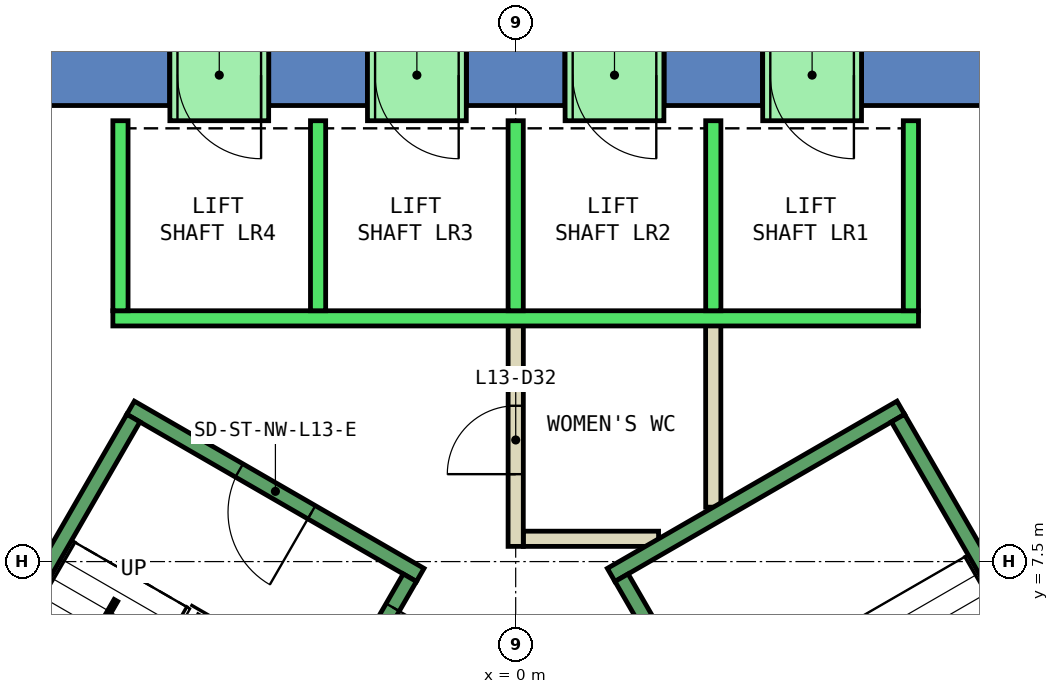
"""IFC4 building model, lengths in metres.
Left out: names, types, materials, properties, quantities, classifications, styles, units other than length and angle.
Written with IfcOpenShell. Run it as: python <this file> out.ifc"""

import sys

from ifc_helpers import new_model, si_unit, direction, frame, frame_2d, origin, place, context, subcontext, project, spatial, polyline, rectangle, outline, extrude, element, fill, save


model = new_model("IFC4")
c1 = context("Model", 3, precision=1e-05, world=origin(), true_north=direction((0.0, 1.0)))
c2 = subcontext(c1, "Body", "Model", "MODEL_VIEW")
j1 = project(units=[si_unit("LENGTHUNIT", "METRE"), si_unit("PLANEANGLEUNIT", "RADIAN")], contexts=[c1])
p1 = place(None, origin())
s1 = spatial("IfcSite", under=j1, at=p1, CompositionType="ELEMENT")
p2 = place(p1, origin())
s2 = spatial("IfcBuilding", under=s1, at=p2, CompositionType="ELEMENT")
p3 = place(p2, frame((0.0, 0.0, 64.4)))
s3 = spatial("IfcBuildingStorey", under=s2, at=p3, CompositionType="ELEMENT", Elevation=64.4)
p4 = place(p3, frame((0.0, 0.0, -0.4)))
e1 = element("IfcWall", 1, at=p4, inside=s3, PredefinedType="SHEAR", context=c2, shape_type="SweptSolid", body=[
    extrude(outline(polyline([(4.55, 14.5), (4.55, 13.5), (6.351, 13.5), (6.928, 14.5), (4.55, 14.5)])), origin(), (0.0, 0.0, 1.0), 4.2),
])
p5 = place(p3, frame((0.0, 0.0, -0.4)))
e2 = element("IfcWall", 2, at=p5, inside=s3, PredefinedType="SHEAR", context=c2, shape_type="SweptSolid", body=[
    extrude(outline(polyline([(1.95, 14.5), (1.95, 13.5), (3.25, 13.5), (3.25, 14.5), (1.95, 14.5)])), origin(), (0.0, 0.0, 1.0), 4.2),
])
p6 = place(p3, frame((0.0, 0.0, -0.4)))
e3 = element("IfcWall", 3, at=p6, inside=s3, PredefinedType="SHEAR", context=c2, shape_type="SweptSolid", body=[
    extrude(outline(polyline([(-0.65, 14.5), (-0.65, 13.5), (0.65, 13.5), (0.65, 14.5), (-0.65, 14.5)])), origin(), (0.0, 0.0, 1.0), 4.2),
])
p7 = place(p3, frame((0.0, 0.0, -0.4)))
e4 = element("IfcWall", 4, at=p7, inside=s3, PredefinedType="SHEAR", context=c2, shape_type="SweptSolid", body=[
    extrude(outline(polyline([(-3.25, 14.5), (-3.25, 13.5), (-1.95, 13.5), (-1.95, 14.5), (-3.25, 14.5)])), origin(), (0.0, 0.0, 1.0), 4.2),
])
p8 = place(p3, frame((0.0, 0.0, -0.4)))
e5 = element("IfcWall", 5, at=p8, inside=s3, PredefinedType="SHEAR", context=c2, shape_type="SweptSolid", body=[
    extrude(outline(polyline([(-4.55, 13.5), (-4.55, 14.5), (-6.928, 14.5), (-6.351, 13.5), (-4.55, 13.5)])), origin(), (0.0, 0.0, 1.0), 4.2),
])
p9 = place(p3, frame((0.0, 0.0, 3.6)))
e6 = element("IfcWall", 6, at=p9, inside=s3, PredefinedType="SHEAR", context=c2, shape_type="SweptSolid", body=[
    extrude(outline(polyline([(3.25, 14.5), (3.25, 13.5), (4.55, 13.5), (4.55, 14.5), (3.25, 14.5)])), origin(), (0.0, 0.0, 1.0), 0.2),
])
p10 = place(p3, frame((0.0, 0.0, 3.6)))
e7 = element("IfcWall", 7, at=p10, inside=s3, PredefinedType="SHEAR", context=c2, shape_type="SweptSolid", body=[
    extrude(outline(polyline([(0.65, 14.5), (0.65, 13.5), (1.95, 13.5), (1.95, 14.5), (0.65, 14.5)])), origin(), (0.0, 0.0, 1.0), 0.2),
])
p11 = place(p3, frame((0.0, 0.0, 3.6)))
e8 = element("IfcWall", 8, at=p11, inside=s3, PredefinedType="SHEAR", context=c2, shape_type="SweptSolid", body=[
    extrude(outline(polyline([(-1.95, 14.5), (-1.95, 13.5), (-0.65, 13.5), (-0.65, 14.5), (-1.95, 14.5)])), origin(), (0.0, 0.0, 1.0), 0.2),
])
p12 = place(p3, frame((0.0, 0.0, 3.6)))
e9 = element("IfcWall", 9, at=p12, inside=s3, PredefinedType="SHEAR", context=c2, shape_type="SweptSolid", body=[
    extrude(outline(polyline([(-4.55, 14.5), (-4.55, 13.5), (-3.25, 13.5), (-3.25, 14.5), (-4.55, 14.5)])), origin(), (0.0, 0.0, 1.0), 0.2),
])
p13 = place(p3, frame((1.88, 7.8, 0.0), z_axis=(0.0, 0.0, 1.0), x_axis=(-1.0, 0.0, 0.0)))
e10 = element("IfcWall", 10, at=p13, inside=s3, PredefinedType="PARTITIONING", context=c2, shape_type="SweptSolid", body=[
    extrude(rectangle(XDim=1.78, YDim=0.2, at=frame_2d((0.89, 0.0))), origin(), (0.0, 0.0, 1.0), 3.8),
])
p14 = place(p3, frame((0.0, 7.7, 0.0), z_axis=(0.0, 0.0, 1.0), x_axis=(0.000325520816, 0.999999947018, 0.0)))
e11 = element("IfcWall", 11, at=p14, inside=s3, PredefinedType="PARTITIONING", context=c2, shape_type="SweptSolid", body=[
    extrude(rectangle(XDim=3.0, YDim=0.2, at=frame_2d((1.5, 0.0))), origin(), (0.0, 0.0, 1.0), 3.8),
])
p15 = place(p14, frame((0.95, 0.0, 0.0)))
e12 = element("IfcOpeningElement", 12, at=p15, cuts=e11, PredefinedType="OPENING", context=c2, shape_type="SweptSolid", body=[
    extrude(rectangle(XDim=0.9, YDim=2.1, at=frame_2d((0.45, 1.05))), frame((0.0, 0.11, 0.0), z_axis=(0.0, -1.0, 0.0), x_axis=(1.0, 0.0, 0.0)), (0.0, 0.0, 1.0), 0.22),
])
p16 = place(p3, frame((2.599, 10.7, 0.0), z_axis=(0.0, 0.0, 1.0), x_axis=(0.000393159002, -0.999999922713, 0.0)))
e13 = element("IfcWall", 13, at=p16, inside=s3, PredefinedType="PARTITIONING", context=c2, shape_type="SweptSolid", body=[
    extrude(rectangle(XDim=2.484, YDim=0.2, at=frame_2d((1.242, 0.0))), origin(), (0.0, 0.0, 1.0), 3.8),
])
p17 = place(p3, frame((5.3, 10.7, 0.0), z_axis=(0.0, 0.0, 1.0), x_axis=(-1.0, 0.0, 0.0)))
e14 = element("IfcWall", 14, at=p17, inside=s3, PredefinedType="STANDARD", context=c2, shape_type="SweptSolid", body=[
    extrude(rectangle(XDim=10.6, YDim=0.2, at=frame_2d((5.3, 0.0))), origin(), (0.0, 0.0, 1.0), 3.8),
])
for number, where, z_axis, x_axis in (
    (15, (5.2, 10.8, 0.0), (0.0, 0.0, 1.0), (0.0, 1.0, 0.0)),
    (16, (2.6, 10.8, 0.0), (0.0, 0.0, 1.0), (0.0, 1.0, 0.0)),
    (17, (0.0, 10.8, 0.0), (0.0, 0.0, 1.0), (0.0, 1.0, 0.0)),
    (18, (-2.6, 10.8, 0.0), (0.0, 0.0, 1.0), (0.0, 1.0, 0.0)),
    (19, (-5.2, 10.8, 0.0), (0.0, 0.0, 1.0), (0.0, 1.0, 0.0)),
):
    element("IfcWall", number, at=place(p3, frame(where, z_axis=z_axis, x_axis=x_axis)), inside=s3, PredefinedType="STANDARD", context=c2, shape_type="SweptSolid", body=[
        extrude(rectangle(XDim=2.5, YDim=0.2, at=frame_2d((1.25, 0.0))), origin(), (0.0, 0.0, 1.0), 3.8),
    ])
p18 = place(p3, frame((4.55, 13.9, 0.0), z_axis=(0.0, 0.0, 1.0), x_axis=(-1.0, 0.0, 0.0)))
e20 = element("IfcWall", 20, at=p18, inside=s3, PredefinedType="STANDARD", context=c2, shape_type="SweptSolid", body=[
    extrude(rectangle(XDim=1.3, YDim=1.2, at=frame_2d((0.65, 0.0))), origin(), (0.0, 0.0, 1.0), 2.4),
])
p19 = place(p18, frame((0.1, 0.0, 0.0)))
e21 = element("IfcOpeningElement", 21, at=p19, cuts=e20, PredefinedType="OPENING", context=c2, shape_type="SweptSolid", body=[
    extrude(rectangle(XDim=1.1, YDim=2.3, at=frame_2d((0.55, 1.15))), frame((0.0, 0.61, 0.0), z_axis=(0.0, -1.0, 0.0), x_axis=(1.0, 0.0, 0.0)), (0.0, 0.0, 1.0), 1.22),
])
p20 = place(p3, frame((1.95, 13.9, 0.0), z_axis=(0.0, 0.0, 1.0), x_axis=(-1.0, 0.0, 0.0)))
e22 = element("IfcWall", 22, at=p20, inside=s3, PredefinedType="STANDARD", context=c2, shape_type="SweptSolid", body=[
    extrude(rectangle(XDim=1.3, YDim=1.2, at=frame_2d((0.65, 0.0))), origin(), (0.0, 0.0, 1.0), 2.4),
])
p21 = place(p20, frame((0.1, 0.0, 0.0)))
e23 = element("IfcOpeningElement", 23, at=p21, cuts=e22, PredefinedType="OPENING", context=c2, shape_type="SweptSolid", body=[
    extrude(rectangle(XDim=1.1, YDim=2.3, at=frame_2d((0.55, 1.15))), frame((0.0, 0.61, 0.0), z_axis=(0.0, -1.0, 0.0), x_axis=(1.0, 0.0, 0.0)), (0.0, 0.0, 1.0), 1.22),
])
p22 = place(p3, frame((-0.65, 13.9, 0.0), z_axis=(0.0, 0.0, 1.0), x_axis=(-1.0, 0.0, 0.0)))
e24 = element("IfcWall", 24, at=p22, inside=s3, PredefinedType="STANDARD", context=c2, shape_type="SweptSolid", body=[
    extrude(rectangle(XDim=1.3, YDim=1.2, at=frame_2d((0.65, 0.0))), origin(), (0.0, 0.0, 1.0), 2.4),
])
p23 = place(p22, frame((0.1, 0.0, 0.0)))
e25 = element("IfcOpeningElement", 25, at=p23, cuts=e24, PredefinedType="OPENING", context=c2, shape_type="SweptSolid", body=[
    extrude(rectangle(XDim=1.1, YDim=2.3, at=frame_2d((0.55, 1.15))), frame((0.0, 0.61, 0.0), z_axis=(0.0, -1.0, 0.0), x_axis=(1.0, 0.0, 0.0)), (0.0, 0.0, 1.0), 1.22),
])
p24 = place(p3, frame((-3.25, 13.9, 0.0), z_axis=(0.0, 0.0, 1.0), x_axis=(-1.0, 0.0, 0.0)))
e26 = element("IfcWall", 26, at=p24, inside=s3, PredefinedType="STANDARD", context=c2, shape_type="SweptSolid", body=[
    extrude(rectangle(XDim=1.3, YDim=1.2, at=frame_2d((0.65, 0.0))), origin(), (0.0, 0.0, 1.0), 2.4),
])
p25 = place(p24, frame((0.1, 0.0, 0.0)))
e27 = element("IfcOpeningElement", 27, at=p25, cuts=e26, PredefinedType="OPENING", context=c2, shape_type="SweptSolid", body=[
    extrude(rectangle(XDim=1.1, YDim=2.3, at=frame_2d((0.55, 1.15))), frame((0.0, 0.61, 0.0), z_axis=(0.0, -1.0, 0.0), x_axis=(1.0, 0.0, 0.0)), (0.0, 0.0, 1.0), 1.22),
])
p26 = place(p3, frame((1.256, 7.324, 0.0), z_axis=(0.0, 0.0, 1.0), x_axis=(0.866046073146, 0.499964197906, 0.0)))
e28 = element("IfcWall", 28, at=p26, inside=s3, PredefinedType="STANDARD", context=c2, shape_type="SweptSolid", body=[
    extrude(rectangle(XDim=4.4, YDim=0.2, at=frame_2d((2.2, 0.0))), origin(), (0.0, 0.0, 1.0), 3.8),
])
p27 = place(p3, frame((4.843, 1.312, 0.0), z_axis=(0.0, 0.0, 1.0), x_axis=(-0.499963383562, 0.866046543262, 0.0)))
e29 = element("IfcWall", 29, at=p27, inside=s3, PredefinedType="STANDARD", context=c2, shape_type="SweptSolid", body=[
    extrude(rectangle(XDim=6.9, YDim=0.2, at=frame_2d((3.45, 0.0))), origin(), (0.0, 0.0, 1.0), 3.8),
])
p28 = place(p27, frame((0.45, 0.0, 0.0)))
e30 = element("IfcOpeningElement", 30, at=p28, cuts=e29, PredefinedType="OPENING", context=c2, shape_type="SweptSolid", body=[
    extrude(rectangle(XDim=1.1, YDim=2.2, at=frame_2d((0.55, 1.1))), frame((0.0, 0.11, 0.0), z_axis=(0.0, -1.0, 0.0), x_axis=(1.0, 0.0, 0.0)), (0.0, 0.0, 1.0), 0.22),
])
p29 = place(p3, frame((8.48, 3.412, 0.0), z_axis=(0.0, 0.0, 1.0), x_axis=(-0.499978703459, 0.866037698999, 0.0)))
e31 = element("IfcWall", 31, at=p29, inside=s3, PredefinedType="STANDARD", context=c2, shape_type="SweptSolid", body=[
    extrude(rectangle(XDim=6.9, YDim=0.2, at=frame_2d((3.45, 0.0))), origin(), (0.0, 0.0, 1.0), 3.8),
])
p30 = place(p3, frame((-1.256, 7.324, 0.0), z_axis=(0.0, 0.0, 1.0), x_axis=(-0.866046073146, 0.499964197906, 0.0)))
e32 = element("IfcWall", 32, at=p30, inside=s3, PredefinedType="STANDARD", context=c2, shape_type="SweptSolid", body=[
    extrude(rectangle(XDim=4.4, YDim=0.2, at=frame_2d((2.2, 0.0))), origin(), (0.0, 0.0, 1.0), 3.8),
])
p31 = place(p30, frame((1.65, 0.0, 0.0)))
e33 = element("IfcOpeningElement", 33, at=p31, cuts=e32, PredefinedType="OPENING", context=c2, shape_type="SweptSolid", body=[
    extrude(rectangle(XDim=1.1, YDim=2.2, at=frame_2d((0.55, 1.1))), frame((0.0, 0.11, 0.0), z_axis=(0.0, -1.0, 0.0), x_axis=(1.0, 0.0, 0.0)), (0.0, 0.0, 1.0), 0.22),
])
p32 = place(p3, frame((-1.393, 7.288, 0.0), z_axis=(0.0, 0.0, 1.0), x_axis=(-0.499963383562, -0.866046543262, 0.0)))
e34 = element("IfcWall", 34, at=p32, inside=s3, PredefinedType="STANDARD", context=c2, shape_type="SweptSolid", body=[
    extrude(rectangle(XDim=6.9, YDim=0.2, at=frame_2d((3.45, 0.0))), origin(), (0.0, 0.0, 1.0), 3.8),
])
p33 = place(p32, frame((0.45, 0.0, 0.0)))
e35 = element("IfcOpeningElement", 35, at=p33, cuts=e34, PredefinedType="OPENING", context=c2, shape_type="SweptSolid", body=[
    extrude(rectangle(XDim=1.1, YDim=2.2, at=frame_2d((0.55, 1.1))), frame((0.0, 0.11, 0.0), z_axis=(0.0, -1.0, 0.0), x_axis=(1.0, 0.0, 0.0)), (0.0, 0.0, 1.0), 0.22),
])
p34 = place(p3, frame((-5.03, 9.388, 0.0), z_axis=(0.0, 0.0, 1.0), x_axis=(-0.499978703459, -0.866037698999, 0.0)))
e36 = element("IfcWall", 36, at=p34, inside=s3, PredefinedType="STANDARD", context=c2, shape_type="SweptSolid", body=[
    extrude(rectangle(XDim=6.9, YDim=0.2, at=frame_2d((3.45, 0.0))), origin(), (0.0, 0.0, 1.0), 3.8),
])
p35 = place(p15, origin())
e37 = element("IfcDoor", 37, at=p35, inside=s3, OperationType="SINGLE_SWING_RIGHT", PredefinedType="DOOR", context=c2, shape_type="SweptSolid", body=[
    extrude(rectangle(XDim=0.9, YDim=2.1, at=frame_2d((0.45, 1.05))), frame((0.0, 0.025, 0.0), z_axis=(0.0, -1.0, 0.0), x_axis=(1.0, 0.0, 0.0)), (0.0, 0.0, 1.0), 0.05),
])
fill(e12, e37)
p36 = place(p19, origin())
e38 = element("IfcDoor", 38, at=p36, inside=s3, OperationType="SLIDING_TO_LEFT", PredefinedType="DOOR", context=c2, shape_type="SweptSolid", body=[
    extrude(rectangle(XDim=1.1, YDim=2.3, at=frame_2d((0.55, 1.15))), frame((0.0, 0.025, 0.0), z_axis=(0.0, -1.0, 0.0), x_axis=(1.0, 0.0, 0.0)), (0.0, 0.0, 1.0), 0.05),
])
fill(e21, e38)
p37 = place(p21, origin())
e39 = element("IfcDoor", 39, at=p37, inside=s3, OperationType="SLIDING_TO_LEFT", PredefinedType="DOOR", context=c2, shape_type="SweptSolid", body=[
    extrude(rectangle(XDim=1.1, YDim=2.3, at=frame_2d((0.55, 1.15))), frame((0.0, 0.025, 0.0), z_axis=(0.0, -1.0, 0.0), x_axis=(1.0, 0.0, 0.0)), (0.0, 0.0, 1.0), 0.05),
])
fill(e23, e39)
p38 = place(p23, origin())
e40 = element("IfcDoor", 40, at=p38, inside=s3, OperationType="SLIDING_TO_LEFT", PredefinedType="DOOR", context=c2, shape_type="SweptSolid", body=[
    extrude(rectangle(XDim=1.1, YDim=2.3, at=frame_2d((0.55, 1.15))), frame((0.0, 0.025, 0.0), z_axis=(0.0, -1.0, 0.0), x_axis=(1.0, 0.0, 0.0)), (0.0, 0.0, 1.0), 0.05),
])
fill(e25, e40)
p39 = place(p25, origin())
e41 = element("IfcDoor", 41, at=p39, inside=s3, OperationType="SLIDING_TO_LEFT", PredefinedType="DOOR", context=c2, shape_type="SweptSolid", body=[
    extrude(rectangle(XDim=1.1, YDim=2.3, at=frame_2d((0.55, 1.15))), frame((0.0, 0.025, 0.0), z_axis=(0.0, -1.0, 0.0), x_axis=(1.0, 0.0, 0.0)), (0.0, 0.0, 1.0), 0.05),
])
fill(e27, e41)
p40 = place(p33, origin())
e42 = element("IfcDoor", 42, at=p40, inside=s3, OperationType="SINGLE_SWING_LEFT", PredefinedType="DOOR", context=c2, shape_type="SweptSolid", body=[
    extrude(rectangle(XDim=1.1, YDim=2.2, at=frame_2d((0.55, 1.1))), frame((0.0, 0.025, 0.0), z_axis=(0.0, -1.0, 0.0), x_axis=(1.0, 0.0, 0.0)), (0.0, 0.0, 1.0), 0.05),
])
fill(e35, e42)
p41 = place(p31, origin())
e43 = element("IfcDoor", 43, at=p41, inside=s3, OperationType="SINGLE_SWING_LEFT", PredefinedType="DOOR", context=c2, shape_type="SweptSolid", body=[
    extrude(rectangle(XDim=1.1, YDim=2.2, at=frame_2d((0.55, 1.1))), frame((0.0, 0.025, 0.0), z_axis=(0.0, -1.0, 0.0), x_axis=(1.0, 0.0, 0.0)), (0.0, 0.0, 1.0), 0.05),
])
fill(e33, e43)
save(model, sys.argv[1])
